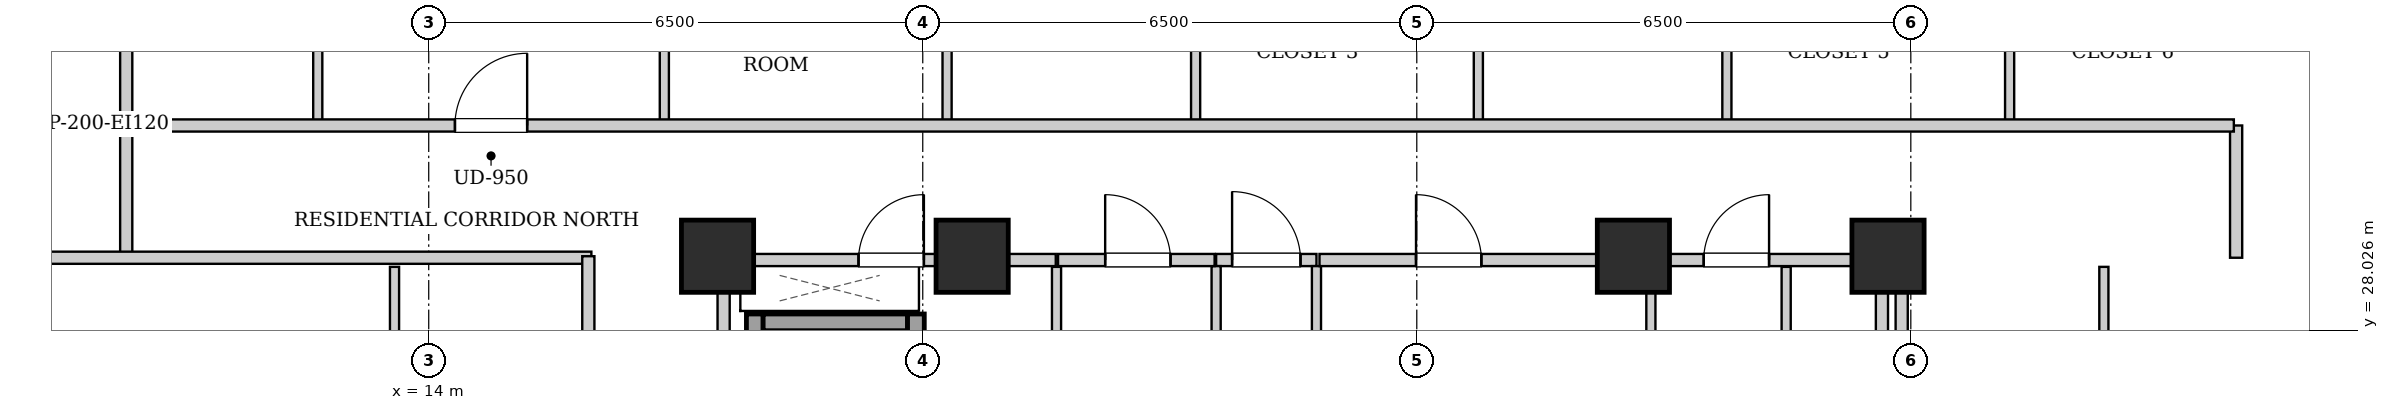
"""IFC4 building model, lengths in metres.
Left out: names, types, materials, properties, quantities, classifications, styles, units other than length and angle.
Written with IfcOpenShell. Run it as: python <this file> out.ifc"""

import sys

from ifc_helpers import new_model, si_unit, direction, frame, frame_2d, origin, origin_2d, place, context, subcontext, project, spatial, rectangle, extrude, element, fill, save


model = new_model("IFC4")
c1 = context("Model", 3, precision=1e-05, world=origin(), true_north=direction((0.0, 1.0)))
c2 = subcontext(c1, "Body", "Model", "MODEL_VIEW")
j1 = project(units=[si_unit("LENGTHUNIT", "METRE"), si_unit("PLANEANGLEUNIT", "RADIAN")], contexts=[c1])
p1 = place(None, origin())
s1 = spatial("IfcSite", under=j1, at=p1, CompositionType="ELEMENT")
p2 = place(p1, origin())
s2 = spatial("IfcBuilding", under=s1, at=p2, CompositionType="ELEMENT")
p3 = place(p2, frame((0.0, 0.0, 150.4)))
s3 = spatial("IfcBuildingStorey", under=s2, at=p3, CompositionType="ELEMENT", Elevation=150.4)
for number, where, z_axis, x_axis in (
    (1, (17.8, 29.0, 0.0), (0.0, 0.0, 1.0), (1.0, 0.0, 0.0)),
    (2, (21.15, 29.0, 0.0), (0.0, 0.0, 1.0), (1.0, 0.0, 0.0)),
    (3, (29.85, 29.0, 0.0), (0.0, 0.0, 1.0), (1.0, 0.0, 0.0)),
    (4, (33.2, 29.0, 0.0), (0.0, 0.0, 1.0), (1.0, 0.0, 0.0)),
):
    element("IfcColumn", number, at=place(p3, frame(where, z_axis=z_axis, x_axis=x_axis)), inside=s3, PredefinedType="COLUMN", context=c2, shape_type="SweptSolid", body=[
        extrude(rectangle(XDim=0.95, YDim=0.95, at=origin_2d()), origin(), (0.0, 0.0, 1.0), 3.25),
    ])
p4 = place(p3, frame((18.29, 24.1, 0.0), z_axis=(0.0, 0.0, 1.0), x_axis=(0.0, 1.0, 0.0)))
e5 = element("IfcWall", 5, at=p4, inside=s3, PredefinedType="SHEAR", context=c2, shape_type="SweptSolid", body=[
    extrude(rectangle(XDim=4.14, YDim=0.22, at=frame_2d((2.07, 0.0))), origin(), (0.0, 0.0, 1.0), 2.99),
])
p5 = place(p3, frame((18.4, 28.13, 0.0), z_axis=(0.0, 0.0, 1.0), x_axis=(1.0, 0.0, 0.0)))
e6 = element("IfcWall", 6, at=p5, inside=s3, PredefinedType="SHEAR", context=c2, shape_type="SweptSolid", body=[
    extrude(rectangle(XDim=1.9, YDim=0.22, at=frame_2d((0.95, 0.0))), origin(), (0.0, 0.0, 1.0), 2.99),
])
p6 = place(p3, frame((20.41, 26.06, 0.0), z_axis=(0.0, 0.0, 1.0), x_axis=(0.0, 1.0, 0.0)))
e7 = element("IfcWall", 7, at=p6, inside=s3, PredefinedType="SHEAR", context=c2, shape_type="SweptSolid", body=[
    extrude(rectangle(XDim=2.18, YDim=0.22, at=frame_2d((1.09, 0.0))), origin(), (0.0, 0.0, 1.0), 2.99),
])
for number, where, z_axis, x_axis in (
    (8, (17.88, 24.12, 0.0), (0.0, 0.0, 1.0), (0.0, 1.0, 0.0)),
    (9, (33.12, 24.12, 0.0), (0.0, 0.0, 1.0), (0.0, 1.0, 0.0)),
):
    element("IfcWall", number, at=place(p3, frame(where, z_axis=z_axis, x_axis=x_axis)), inside=s3, PredefinedType="PARTITIONING", context=c2, shape_type="SweptSolid", body=[
        extrude(rectangle(XDim=4.76, YDim=0.16, at=frame_2d((2.38, 0.0))), origin(), (0.0, 0.0, 1.0), 2.99),
    ])
p7 = place(p3, frame((24.36, 28.95, 0.0), z_axis=(0.0, 0.0, 1.0), x_axis=(1.0, 0.0, 0.0)))
e10 = element("IfcWall", 10, at=p7, inside=s3, PredefinedType="PARTITIONING", context=c2, shape_type="SweptSolid", body=[
    extrude(rectangle(XDim=1.32, YDim=0.16, at=frame_2d((0.66, 0.0))), origin(), (0.0, 0.0, 1.0), 2.442),
])
p8 = place(p7, frame((0.21, 0.0, 0.0)))
e11 = element("IfcOpeningElement", 11, at=p8, cuts=e10, PredefinedType="OPENING", context=c2, shape_type="SweptSolid", body=[
    extrude(rectangle(XDim=0.9, YDim=2.05, at=frame_2d((0.45, 1.025))), frame((0.0, 0.09, 0.0), z_axis=(0.0, -1.0, 0.0), x_axis=(1.0, 0.0, 0.0)), (0.0, 0.0, 1.0), 0.18),
])
p9 = place(p3, frame((17.96, 28.95, 0.0), z_axis=(0.0, 0.0, 1.0), x_axis=(1.0, 0.0, 0.0)))
e12 = element("IfcWall", 12, at=p9, inside=s3, PredefinedType="PARTITIONING", context=c2, shape_type="SweptSolid", body=[
    extrude(rectangle(XDim=4.29, YDim=0.16, at=frame_2d((2.145, 0.0))), origin(), (0.0, 0.0, 1.0), 2.442),
])
p10 = place(p9, frame((1.695, 0.0, 0.0)))
e13 = element("IfcOpeningElement", 13, at=p10, cuts=e12, PredefinedType="OPENING", context=c2, shape_type="SweptSolid", body=[
    extrude(rectangle(XDim=0.86, YDim=2.05, at=frame_2d((0.43, 1.025))), frame((0.0, 0.09, 0.0), z_axis=(0.0, -1.0, 0.0), x_axis=(1.0, 0.0, 0.0)), (0.0, 0.0, 1.0), 0.18),
])
for number, where, z_axis, x_axis in (
    (14, (24.36, 25.0, 0.0), (0.0, 0.0, 1.0), (0.0, 1.0, 0.0)),
    (15, (25.68, 25.0, 0.0), (0.0, 0.0, 1.0), (0.0, 1.0, 0.0)),
):
    element("IfcWall", number, at=place(p3, frame(where, z_axis=z_axis, x_axis=x_axis)), inside=s3, PredefinedType="PARTITIONING", context=c2, shape_type="SweptSolid", body=[
        extrude(rectangle(XDim=3.87, YDim=0.12, at=frame_2d((1.935, 0.0))), origin(), (0.0, 0.0, 1.0), 2.99),
    ])
p11 = place(p3, frame((30.08, 26.18, 0.0), z_axis=(0.0, 0.0, 1.0), x_axis=(0.0, 1.0, 0.0)))
e16 = element("IfcWall", 16, at=p11, inside=s3, PredefinedType="PARTITIONING", context=c2, shape_type="SweptSolid", body=[
    extrude(rectangle(XDim=2.68, YDim=0.12, at=frame_2d((1.34, 0.0))), origin(), (0.0, 0.0, 1.0), 2.99),
])
p12 = place(p3, frame((31.86, 26.2, 0.0), z_axis=(0.0, 0.0, 1.0), x_axis=(0.0, 1.0, 0.0)))
e17 = element("IfcWall", 17, at=p12, inside=s3, PredefinedType="PARTITIONING", context=c2, shape_type="SweptSolid", body=[
    extrude(rectangle(XDim=2.66, YDim=0.12, at=frame_2d((1.33, 0.0))), origin(), (0.0, 0.0, 1.0), 2.99),
])
p13 = place(p12, frame((0.92, 0.0, 0.0)))
e18 = element("IfcOpeningElement", 18, at=p13, cuts=e17, PredefinedType="OPENING", context=c2, shape_type="SweptSolid", body=[
    extrude(rectangle(XDim=0.86, YDim=2.05, at=frame_2d((0.43, 1.025))), frame((0.0, 0.07, 0.0), z_axis=(0.0, -1.0, 0.0), x_axis=(1.0, 0.0, 0.0)), (0.0, 0.0, 1.0), 0.14),
])
p14 = place(p3, frame((30.08, 28.95, 0.0), z_axis=(0.0, 0.0, 1.0), x_axis=(1.0, 0.0, 0.0)))
e19 = element("IfcWall", 19, at=p14, inside=s3, PredefinedType="PARTITIONING", context=c2, shape_type="SweptSolid", body=[
    extrude(rectangle(XDim=2.96, YDim=0.16, at=frame_2d((1.48, 0.0))), origin(), (0.0, 0.0, 1.0), 2.99),
])
p15 = place(p14, frame((0.695, 0.0, 0.0)))
e20 = element("IfcOpeningElement", 20, at=p15, cuts=e19, PredefinedType="OPENING", context=c2, shape_type="SweptSolid", body=[
    extrude(rectangle(XDim=0.86, YDim=2.05, at=frame_2d((0.43, 1.025))), frame((0.0, 0.09, 0.0), z_axis=(0.0, -1.0, 0.0), x_axis=(1.0, 0.0, 0.0)), (0.0, 0.0, 1.0), 0.18),
])
p16 = place(p3, frame((22.26, 25.0, 0.0), z_axis=(0.0, 0.0, 1.0), x_axis=(0.0, 1.0, 0.0)))
e21 = element("IfcWall", 21, at=p16, inside=s3, PredefinedType="PARTITIONING", context=c2, shape_type="SweptSolid", body=[
    extrude(rectangle(XDim=3.86, YDim=0.12, at=frame_2d((1.93, 0.0))), origin(), (0.0, 0.0, 1.0), 2.99),
])
p17 = place(p3, frame((22.28, 28.95, 0.0), z_axis=(0.0, 0.0, 1.0), x_axis=(1.0, 0.0, 0.0)))
e22 = element("IfcWall", 22, at=p17, inside=s3, PredefinedType="PARTITIONING", context=c2, shape_type="SweptSolid", body=[
    extrude(rectangle(XDim=2.06, YDim=0.16, at=frame_2d((1.03, 0.0))), origin(), (0.0, 0.0, 1.0), 2.442),
])
p18 = place(p17, frame((0.62, 0.0, 0.0)))
e23 = element("IfcOpeningElement", 23, at=p18, cuts=e22, PredefinedType="OPENING", context=c2, shape_type="SweptSolid", body=[
    extrude(rectangle(XDim=0.86, YDim=2.05, at=frame_2d((0.43, 1.025))), frame((0.0, 0.09, 0.0), z_axis=(0.0, -1.0, 0.0), x_axis=(1.0, 0.0, 0.0)), (0.0, 0.0, 1.0), 0.18),
])
p19 = place(p3, frame((25.72, 28.95, 0.0), z_axis=(0.0, 0.0, 1.0), x_axis=(1.0, 0.0, 0.0)))
e24 = element("IfcWall", 24, at=p19, inside=s3, PredefinedType="PARTITIONING", context=c2, shape_type="SweptSolid", body=[
    extrude(rectangle(XDim=4.32, YDim=0.16, at=frame_2d((2.16, 0.0))), origin(), (0.0, 0.0, 1.0), 2.442),
])
p20 = place(p19, frame((1.27, 0.0, 0.0)))
e25 = element("IfcOpeningElement", 25, at=p20, cuts=e24, PredefinedType="OPENING", context=c2, shape_type="SweptSolid", body=[
    extrude(rectangle(XDim=0.86, YDim=2.05, at=frame_2d((0.43, 1.025))), frame((0.0, 0.09, 0.0), z_axis=(0.0, -1.0, 0.0), x_axis=(1.0, 0.0, 0.0)), (0.0, 0.0, 1.0), 0.18),
])
for number, where, z_axis, x_axis in (
    (26, (10.02, 28.98, 0.0), (0.0, 0.0, 1.0), (0.0, 1.0, 0.0)),
    (27, (37.78, 28.98, 0.0), (0.0, 0.0, 1.0), (0.0, 1.0, 0.0)),
):
    element("IfcWall", number, at=place(p3, frame(where, z_axis=z_axis, x_axis=x_axis)), inside=s3, PredefinedType="PARTITIONING", context=c2, shape_type="SweptSolid", body=[
        extrude(rectangle(XDim=1.74, YDim=0.16, at=frame_2d((0.87, 0.0))), origin(), (0.0, 0.0, 1.0), 2.99),
    ])
p21 = place(p3, frame((7.78, 28.98, 0.0), z_axis=(0.0, 0.0, 1.0), x_axis=(1.0, 0.0, 0.0)))
e28 = element("IfcWall", 28, at=p21, inside=s3, PredefinedType="PARTITIONING", context=c2, shape_type="SweptSolid", body=[
    extrude(rectangle(XDim=8.36, YDim=0.16, at=frame_2d((4.18, 0.0))), origin(), (0.0, 0.0, 1.0), 2.442),
])
p22 = place(p3, frame((10.02, 30.76, 0.0), z_axis=(0.0, 0.0, 1.0), x_axis=(0.0, 1.0, 0.0)))
e29 = element("IfcWall", 29, at=p22, inside=s3, PredefinedType="PARTITIONING", context=c2, shape_type="SweptSolid", body=[
    extrude(rectangle(XDim=2.91, YDim=0.16, at=frame_2d((1.455, 0.0))), origin(), (0.0, 0.0, 1.0), 2.99),
])
p23 = place(p3, frame((12.54, 30.76, 0.0), z_axis=(0.0, 0.0, 1.0), x_axis=(0.0, 1.0, 0.0)))
e30 = element("IfcWall", 30, at=p23, inside=s3, PredefinedType="PARTITIONING", context=c2, shape_type="SweptSolid", body=[
    extrude(rectangle(XDim=2.85, YDim=0.12, at=frame_2d((1.425, 0.0))), origin(), (0.0, 0.0, 1.0), 2.99),
])
p24 = place(p23, frame((0.995, 0.0, 0.0)))
e31 = element("IfcOpeningElement", 31, at=p24, cuts=e30, PredefinedType="OPENING", context=c2, shape_type="SweptSolid", body=[
    extrude(rectangle(XDim=0.86, YDim=2.05, at=frame_2d((0.43, 1.025))), frame((0.0, 0.07, 0.0), z_axis=(0.0, -1.0, 0.0), x_axis=(1.0, 0.0, 0.0)), (0.0, 0.0, 1.0), 0.14),
])
p25 = place(p3, frame((17.1, 30.76, 0.0), z_axis=(0.0, 0.0, 1.0), x_axis=(0.0, 1.0, 0.0)))
e32 = element("IfcWall", 32, at=p25, inside=s3, PredefinedType="PARTITIONING", context=c2, shape_type="SweptSolid", body=[
    extrude(rectangle(XDim=2.85, YDim=0.12, at=frame_2d((1.425, 0.0))), origin(), (0.0, 0.0, 1.0), 2.99),
])
p26 = place(p25, frame((0.975, 0.0, 0.0)))
e33 = element("IfcOpeningElement", 33, at=p26, cuts=e32, PredefinedType="OPENING", context=c2, shape_type="SweptSolid", body=[
    extrude(rectangle(XDim=0.9, YDim=2.05, at=frame_2d((0.45, 1.025))), frame((0.0, 0.07, 0.0), z_axis=(0.0, -1.0, 0.0), x_axis=(1.0, 0.0, 0.0)), (0.0, 0.0, 1.0), 0.14),
])
p27 = place(p3, frame((20.82, 30.76, 0.0), z_axis=(0.0, 0.0, 1.0), x_axis=(0.0, 1.0, 0.0)))
e34 = element("IfcWall", 34, at=p27, inside=s3, PredefinedType="PARTITIONING", context=c2, shape_type="SweptSolid", body=[
    extrude(rectangle(XDim=2.85, YDim=0.12, at=frame_2d((1.425, 0.0))), origin(), (0.0, 0.0, 1.0), 2.99),
])
p28 = place(p27, frame((0.975, 0.0, 0.0)))
e35 = element("IfcOpeningElement", 35, at=p28, cuts=e34, PredefinedType="OPENING", context=c2, shape_type="SweptSolid", body=[
    extrude(rectangle(XDim=0.9, YDim=2.05, at=frame_2d((0.45, 1.025))), frame((0.0, 0.07, 0.0), z_axis=(0.0, -1.0, 0.0), x_axis=(1.0, 0.0, 0.0)), (0.0, 0.0, 1.0), 0.14),
])
p29 = place(p3, frame((24.09, 30.76, 0.0), z_axis=(0.0, 0.0, 1.0), x_axis=(0.0, 1.0, 0.0)))
e36 = element("IfcWall", 36, at=p29, inside=s3, PredefinedType="PARTITIONING", context=c2, shape_type="SweptSolid", body=[
    extrude(rectangle(XDim=2.85, YDim=0.12, at=frame_2d((1.425, 0.0))), origin(), (0.0, 0.0, 1.0), 2.99),
])
p30 = place(p29, frame((0.975, 0.0, 0.0)))
e37 = element("IfcOpeningElement", 37, at=p30, cuts=e36, PredefinedType="OPENING", context=c2, shape_type="SweptSolid", body=[
    extrude(rectangle(XDim=0.9, YDim=2.05, at=frame_2d((0.45, 1.025))), frame((0.0, 0.07, 0.0), z_axis=(0.0, -1.0, 0.0), x_axis=(1.0, 0.0, 0.0)), (0.0, 0.0, 1.0), 0.14),
])
p31 = place(p3, frame((27.81, 30.76, 0.0), z_axis=(0.0, 0.0, 1.0), x_axis=(0.0, 1.0, 0.0)))
e38 = element("IfcWall", 38, at=p31, inside=s3, PredefinedType="PARTITIONING", context=c2, shape_type="SweptSolid", body=[
    extrude(rectangle(XDim=2.85, YDim=0.12, at=frame_2d((1.425, 0.0))), origin(), (0.0, 0.0, 1.0), 2.99),
])
p32 = place(p31, frame((0.975, 0.0, 0.0)))
e39 = element("IfcOpeningElement", 39, at=p32, cuts=e38, PredefinedType="OPENING", context=c2, shape_type="SweptSolid", body=[
    extrude(rectangle(XDim=0.9, YDim=2.05, at=frame_2d((0.45, 1.025))), frame((0.0, 0.07, 0.0), z_axis=(0.0, -1.0, 0.0), x_axis=(1.0, 0.0, 0.0)), (0.0, 0.0, 1.0), 0.14),
])
p33 = place(p3, frame((31.08, 30.76, 0.0), z_axis=(0.0, 0.0, 1.0), x_axis=(0.0, 1.0, 0.0)))
e40 = element("IfcWall", 40, at=p33, inside=s3, PredefinedType="PARTITIONING", context=c2, shape_type="SweptSolid", body=[
    extrude(rectangle(XDim=2.85, YDim=0.12, at=frame_2d((1.425, 0.0))), origin(), (0.0, 0.0, 1.0), 2.99),
])
p34 = place(p33, frame((0.975, 0.0, 0.0)))
e41 = element("IfcOpeningElement", 41, at=p34, cuts=e40, PredefinedType="OPENING", context=c2, shape_type="SweptSolid", body=[
    extrude(rectangle(XDim=0.9, YDim=2.05, at=frame_2d((0.45, 1.025))), frame((0.0, 0.07, 0.0), z_axis=(0.0, -1.0, 0.0), x_axis=(1.0, 0.0, 0.0)), (0.0, 0.0, 1.0), 0.14),
])
p35 = place(p3, frame((34.8, 30.76, 0.0), z_axis=(0.0, 0.0, 1.0), x_axis=(0.0, 1.0, 0.0)))
e42 = element("IfcWall", 42, at=p35, inside=s3, PredefinedType="PARTITIONING", context=c2, shape_type="SweptSolid", body=[
    extrude(rectangle(XDim=2.85, YDim=0.12, at=frame_2d((1.425, 0.0))), origin(), (0.0, 0.0, 1.0), 2.99),
])
p36 = place(p35, frame((0.975, 0.0, 0.0)))
e43 = element("IfcOpeningElement", 43, at=p36, cuts=e42, PredefinedType="OPENING", context=c2, shape_type="SweptSolid", body=[
    extrude(rectangle(XDim=0.9, YDim=2.05, at=frame_2d((0.45, 1.025))), frame((0.0, 0.07, 0.0), z_axis=(0.0, -1.0, 0.0), x_axis=(1.0, 0.0, 0.0)), (0.0, 0.0, 1.0), 0.14),
])
p37 = place(p3, frame((13.55, 24.552, 0.0), z_axis=(0.0, 0.0, 1.0), x_axis=(0.0, 1.0, 0.0)))
e44 = element("IfcWall", 44, at=p37, inside=s3, PredefinedType="PARTITIONING", context=c2, shape_type="SweptSolid", body=[
    extrude(rectangle(XDim=4.308, YDim=0.12, at=frame_2d((2.154, 0.0))), origin(), (0.0, 0.0, 1.0), 2.99),
])
p38 = place(p37, frame((1.704, 0.0, 0.0)))
e45 = element("IfcOpeningElement", 45, at=p38, cuts=e44, PredefinedType="OPENING", context=c2, shape_type="SweptSolid", body=[
    extrude(rectangle(XDim=0.9, YDim=2.05, at=frame_2d((0.45, 1.025))), frame((0.0, 0.07, 0.0), z_axis=(0.0, -1.0, 0.0), x_axis=(1.0, 0.0, 0.0)), (0.0, 0.0, 1.0), 0.14),
])
p39 = place(p3, frame((36.04, 24.552, 0.0), z_axis=(0.0, 0.0, 1.0), x_axis=(0.0, 1.0, 0.0)))
e46 = element("IfcWall", 46, at=p39, inside=s3, PredefinedType="PARTITIONING", context=c2, shape_type="SweptSolid", body=[
    extrude(rectangle(XDim=4.308, YDim=0.12, at=frame_2d((2.154, 0.0))), origin(), (0.0, 0.0, 1.0), 2.99),
])
p40 = place(p39, frame((1.704, 0.0, 0.0)))
e47 = element("IfcOpeningElement", 47, at=p40, cuts=e46, PredefinedType="OPENING", context=c2, shape_type="SweptSolid", body=[
    extrude(rectangle(XDim=0.9, YDim=2.05, at=frame_2d((0.45, 1.025))), frame((0.0, 0.07, 0.0), z_axis=(0.0, -1.0, 0.0), x_axis=(1.0, 0.0, 0.0)), (0.0, 0.0, 1.0), 0.14),
])
p41 = place(p3, frame((10.05, 30.72, 0.0), z_axis=(0.0, 0.0, 1.0), x_axis=(1.0, 0.0, 0.0)))
e48 = element("IfcWall", 48, at=p41, inside=s3, PredefinedType="PARTITIONING", context=c2, shape_type="SweptSolid", body=[
    extrude(rectangle(XDim=27.7, YDim=0.16, at=frame_2d((13.85, 0.0))), origin(), (0.0, 0.0, 1.0), 2.99),
])
p42 = place(p41, frame((4.295, 0.0, 0.0)))
e49 = element("IfcOpeningElement", 49, at=p42, cuts=e48, PredefinedType="OPENING", context=c2, shape_type="SweptSolid", body=[
    extrude(rectangle(XDim=0.95, YDim=2.1, at=frame_2d((0.475, 1.05))), frame((0.0, 0.09, 0.0), z_axis=(0.0, -1.0, 0.0), x_axis=(1.0, 0.0, 0.0)), (0.0, 0.0, 1.0), 0.18),
])
p43 = place(p3, frame((16.1, 15.07, 0.0), z_axis=(0.0, 0.0, 1.0), x_axis=(0.0, 1.0, 0.0)))
e50 = element("IfcWall", 50, at=p43, inside=s3, PredefinedType="PARTITIONING", context=c2, shape_type="SweptSolid", body=[
    extrude(rectangle(XDim=13.93, YDim=0.16, at=frame_2d((6.965, 0.0))), origin(), (0.0, 0.0, 1.0), 2.99),
])
p44 = place(p43, frame((4.385, 0.0, 0.0)))
e51 = element("IfcOpeningElement", 51, at=p44, cuts=e50, PredefinedType="OPENING", context=c2, shape_type="SweptSolid", body=[
    extrude(rectangle(XDim=0.95, YDim=2.1, at=frame_2d((0.475, 1.05))), frame((0.0, 0.09, 0.0), z_axis=(0.0, -1.0, 0.0), x_axis=(1.0, 0.0, 0.0)), (0.0, 0.0, 1.0), 0.18),
])
p45 = place(p3, frame((33.38, 15.02, 0.0), z_axis=(0.0, 0.0, 1.0), x_axis=(0.0, 1.0, 0.0)))
e52 = element("IfcWall", 52, at=p45, inside=s3, PredefinedType="PARTITIONING", context=c2, shape_type="SweptSolid", body=[
    extrude(rectangle(XDim=13.98, YDim=0.16, at=frame_2d((6.99, 0.0))), origin(), (0.0, 0.0, 1.0), 2.99),
])
p46 = place(p8, origin())
e53 = element("IfcDoor", 53, at=p46, inside=s3, OperationType="SINGLE_SWING_LEFT", PredefinedType="DOOR", context=c2, shape_type="SweptSolid", body=[
    extrude(rectangle(XDim=0.9, YDim=2.05, at=frame_2d((0.45, 1.025))), frame((0.0, 0.025, 0.0), z_axis=(0.0, -1.0, 0.0), x_axis=(1.0, 0.0, 0.0)), (0.0, 0.0, 1.0), 0.05),
])
fill(e11, e53)
p47 = place(p10, origin())
e54 = element("IfcDoor", 54, at=p47, inside=s3, OperationType="SINGLE_SWING_RIGHT", PredefinedType="DOOR", context=c2, shape_type="SweptSolid", body=[
    extrude(rectangle(XDim=0.86, YDim=2.05, at=frame_2d((0.43, 1.025))), frame((0.0, 0.025, 0.0), z_axis=(0.0, -1.0, 0.0), x_axis=(1.0, 0.0, 0.0)), (0.0, 0.0, 1.0), 0.05),
])
fill(e13, e54)
p48 = place(p15, origin())
e55 = element("IfcDoor", 55, at=p48, inside=s3, OperationType="SINGLE_SWING_RIGHT", PredefinedType="DOOR", context=c2, shape_type="SweptSolid", body=[
    extrude(rectangle(XDim=0.86, YDim=2.05, at=frame_2d((0.43, 1.025))), frame((0.0, 0.025, 0.0), z_axis=(0.0, -1.0, 0.0), x_axis=(1.0, 0.0, 0.0)), (0.0, 0.0, 1.0), 0.05),
])
fill(e20, e55)
p49 = place(p18, origin())
e56 = element("IfcDoor", 56, at=p49, inside=s3, OperationType="SINGLE_SWING_LEFT", PredefinedType="DOOR", context=c2, shape_type="SweptSolid", body=[
    extrude(rectangle(XDim=0.86, YDim=2.05, at=frame_2d((0.43, 1.025))), frame((0.0, 0.025, 0.0), z_axis=(0.0, -1.0, 0.0), x_axis=(1.0, 0.0, 0.0)), (0.0, 0.0, 1.0), 0.05),
])
fill(e23, e56)
p50 = place(p20, origin())
e57 = element("IfcDoor", 57, at=p50, inside=s3, OperationType="SINGLE_SWING_LEFT", PredefinedType="DOOR", context=c2, shape_type="SweptSolid", body=[
    extrude(rectangle(XDim=0.86, YDim=2.05, at=frame_2d((0.43, 1.025))), frame((0.0, 0.025, 0.0), z_axis=(0.0, -1.0, 0.0), x_axis=(1.0, 0.0, 0.0)), (0.0, 0.0, 1.0), 0.05),
])
fill(e25, e57)
p51 = place(p42, origin())
e58 = element("IfcDoor", 58, at=p51, inside=s3, OperationType="SINGLE_SWING_RIGHT", PredefinedType="DOOR", context=c2, shape_type="SweptSolid", body=[
    extrude(rectangle(XDim=0.95, YDim=2.1, at=frame_2d((0.475, 1.05))), frame((0.0, 0.025, 0.0), z_axis=(0.0, -1.0, 0.0), x_axis=(1.0, 0.0, 0.0)), (0.0, 0.0, 1.0), 0.05),
])
fill(e49, e58)
save(model, sys.argv[1])
